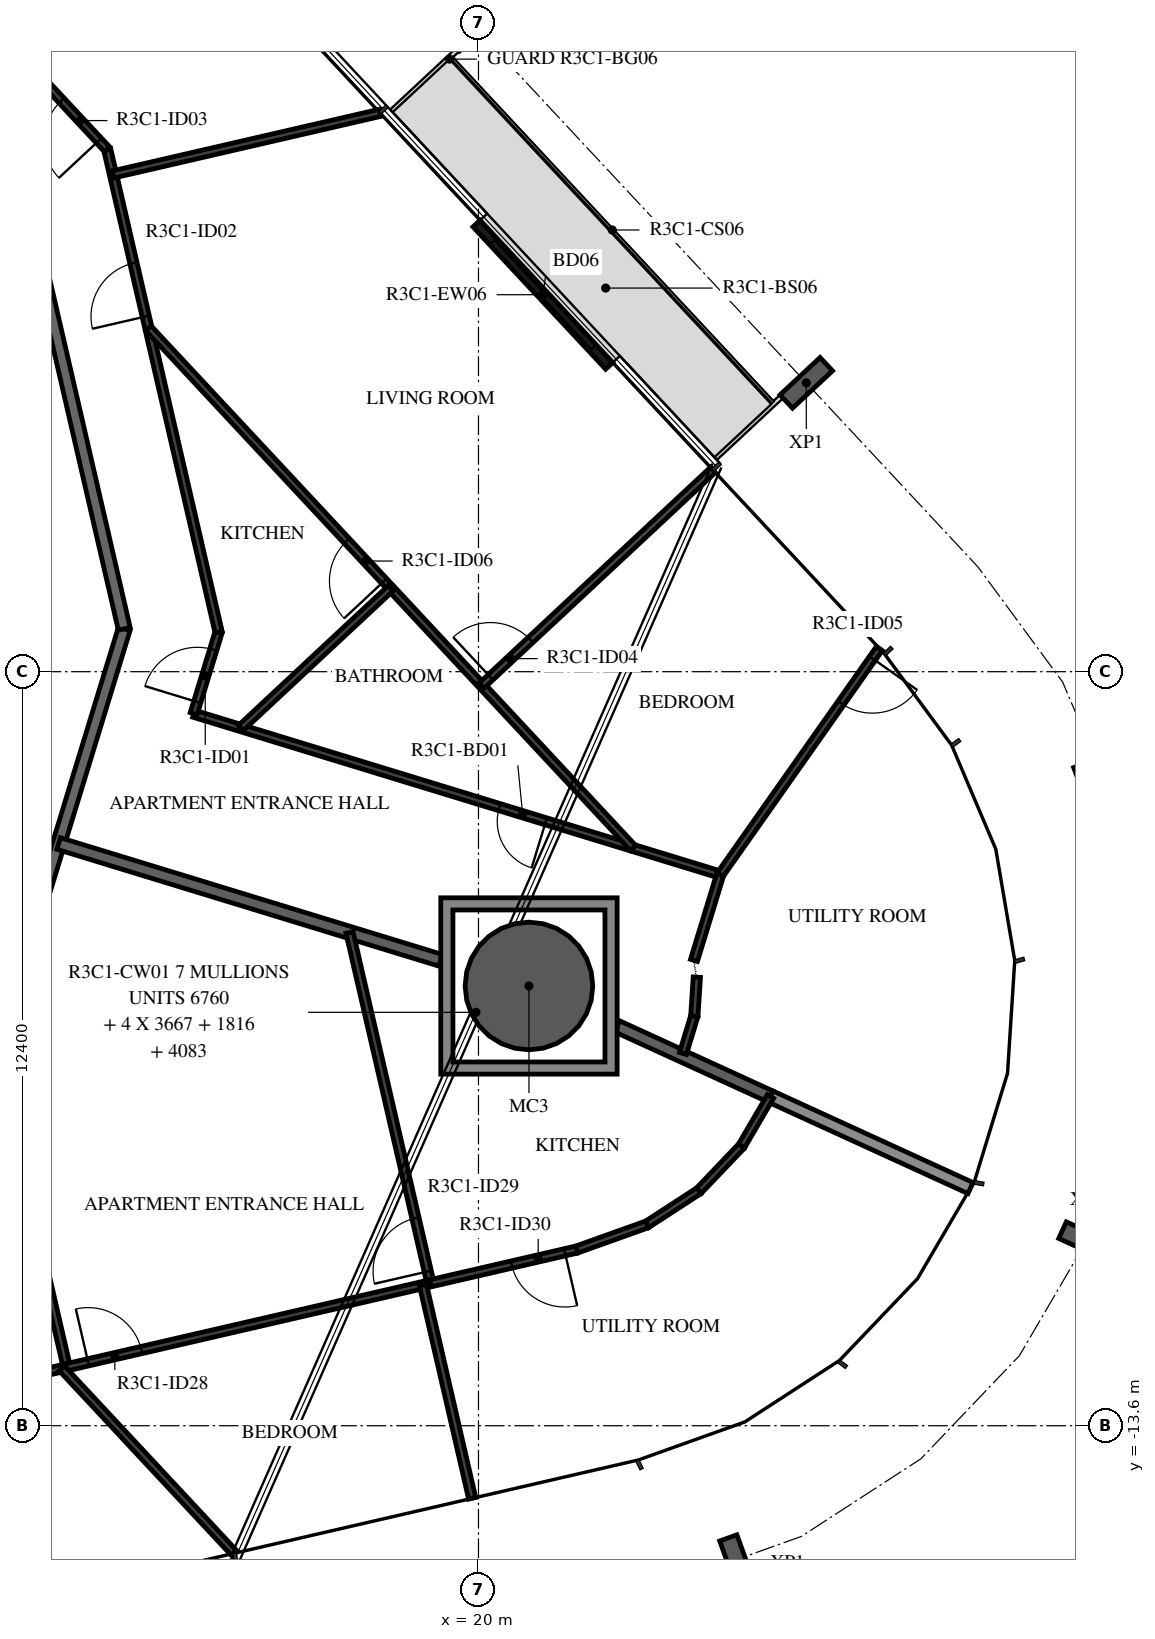
"""IFC4 building model, lengths in metres.
Left out: names, types, materials, properties, quantities, classifications, styles, units other than length and angle.
Written with IfcOpenShell. Run it as: python <this file> out.ifc"""

import sys

from ifc_helpers import new_model, si_unit, direction, frame, frame_2d, origin, origin_2d, place, context, subcontext, project, spatial, polyline, rectangle, hollow_circle, i_section, outline, extrude, element, fill, save


model = new_model("IFC4")
c1 = context("Model", 3, precision=1e-05, world=origin(), true_north=direction((0.0, 1.0)))
c2 = subcontext(c1, "Body", "Model", "MODEL_VIEW")
j1 = project(units=[si_unit("LENGTHUNIT", "METRE"), si_unit("PLANEANGLEUNIT", "RADIAN")], contexts=[c1])
p1 = place(None, origin())
s1 = spatial("IfcSite", under=j1, at=p1, CompositionType="ELEMENT")
p2 = place(p1, origin())
s2 = spatial("IfcBuilding", under=s1, at=p2, CompositionType="ELEMENT")
p3 = place(p2, frame((0.0, 0.0, 137.9)))
s3 = spatial("IfcBuildingStorey", under=s2, at=p3, CompositionType="ELEMENT", Elevation=137.9)
p4 = place(p3, frame((20.83, -6.368, -0.38), z_axis=(0.0, 0.0, 1.0), x_axis=(1.0, 0.0, 0.0)))
e1 = element("IfcColumn", 1, at=p4, inside=s3, PredefinedType="COLUMN", context=c2, shape_type="SweptSolid", body=[
    extrude(hollow_circle(Radius=1.05, WallThickness=0.05, at=origin_2d()), origin(), (0.0, 0.0, 1.0), 3.5),
])
for number, where, z_axis, x_axis in (
    (2, (24.261, -15.868, -0.38), (0.0, 0.0, 1.0), (-0.941, -0.34, 0.0)),
    (3, (30.014, -10.571, -0.38), (0.0, 0.0, 1.0), (-0.416, -0.909, 0.0)),
    (4, (30.262, -2.756, -0.38), (0.0, 0.0, 1.0), (0.358, -0.934, 0.0)),
    (5, (25.391, 3.55, -0.38), (0.0, 0.0, 1.0), (0.682, -0.731, 0.0)),
):
    element("IfcColumn", number, at=place(p3, frame(where, z_axis=z_axis, x_axis=x_axis)), inside=s3, PredefinedType="COLUMN", context=c2, shape_type="SweptSolid", body=[
        extrude(i_section(OverallWidth=0.3, OverallDepth=0.9, WebThickness=0.019, FlangeThickness=0.035, FilletRadius=0.03, at=origin_2d()), origin(), (0.0, 0.0, 1.0), 3.5),
    ])
p5 = place(p3, frame((22.15, 3.829, 0.0), z_axis=(0.0, 0.0, 1.0), x_axis=(-0.682035508355, 0.731319058512, 0.0)))
e6 = element("IfcWall", 6, at=p5, inside=s3, PredefinedType="STANDARD", context=c2, shape_type="SweptSolid", body=[
    extrude(rectangle(XDim=3.2, YDim=0.16, at=frame_2d((1.6, 0.0))), origin(), (0.0, 0.0, 1.0), 3.12),
])
p6 = place(p5, frame((0.4, 0.0, 0.0)))
e7 = element("IfcOpeningElement", 7, at=p6, cuts=e6, PredefinedType="OPENING", context=c2, shape_type="SweptSolid", body=[
    extrude(rectangle(XDim=2.4, YDim=2.4, at=frame_2d((1.2, 1.2))), frame((0.0, 0.09, 0.0), z_axis=(0.0, -1.0, 0.0), x_axis=(1.0, 0.0, 0.0)), (0.0, 0.0, 1.0), 0.18),
])
p7 = place(p3, frame((12.028, -7.516, 0.0), z_axis=(0.0, 0.0, 1.0), x_axis=(0.292365533182, 0.956306642771, 0.0)))
e8 = element("IfcWall", 8, at=p7, inside=s3, PredefinedType="STANDARD", context=c2, shape_type="SweptSolid", body=[
    extrude(rectangle(XDim=7.342, YDim=0.2, at=frame_2d((3.671, 0.0))), origin(), (0.0, 0.0, 1.0), 3.12),
])
p8 = place(p3, frame((14.175, -0.495, 0.0), z_axis=(0.0, 0.0, 1.0), x_axis=(-0.224922649383, 0.974376622151, 0.0)))
e9 = element("IfcWall", 9, at=p8, inside=s3, PredefinedType="STANDARD", context=c2, shape_type="SweptSolid", body=[
    extrude(rectangle(XDim=7.342, YDim=0.2, at=frame_2d((3.671, 0.0))), origin(), (0.0, 0.0, 1.0), 3.12),
])
p9 = place(p3, frame((13.095, -4.026, 0.0), z_axis=(0.0, 0.0, 1.0), x_axis=(0.956303942966, -0.292374363904, 0.0)))
e10 = element("IfcWall", 10, at=p9, inside=s3, PredefinedType="STANDARD", context=c2, shape_type="SweptSolid", body=[
    extrude(rectangle(XDim=6.567, YDim=0.2, at=frame_2d((3.284, 0.0))), origin(), (0.0, 0.0, 1.0), 3.12),
])
p10 = place(p3, frame((22.28, -7.032, 0.0), z_axis=(0.0, 0.0, 1.0), x_axis=(0.909302252994, -0.416136291016, 0.0)))
e11 = element("IfcWall", 11, at=p10, inside=s3, PredefinedType="STANDARD", context=c2, shape_type="SweptSolid", body=[
    extrude(rectangle(XDim=2.773, YDim=0.2, at=frame_2d((1.387, 0.0))), origin(), (0.0, 0.0, 1.0), 3.12),
])
p11 = place(p3, frame((24.802, -8.186, 0.0), z_axis=(0.0, 0.0, 1.0), x_axis=(0.909307466213, -0.416124899387, 0.0)))
e12 = element("IfcWall", 12, at=p11, inside=s3, PredefinedType="STANDARD", context=c2, shape_type="SweptSolid", body=[
    extrude(rectangle(XDim=3.618, YDim=0.2, at=frame_2d((1.809, 0.0))), origin(), (0.0, 0.0, 1.0), 2.73),
])
p12 = place(p3, frame((23.975, -4.537, 0.0), z_axis=(0.0, 0.0, 1.0), x_axis=(-0.956300480156, 0.292385689892, 0.0)))
e13 = element("IfcWall", 13, at=p12, inside=s3, PredefinedType="PARTITIONING", context=c2, shape_type="SweptSolid", body=[
    extrude(rectangle(XDim=9.054, YDim=0.12, at=frame_2d((4.527, 0.0))), origin(), (0.0, 0.0, 1.0), 3.12),
])
p13 = place(p12, frame((2.998, 0.0, 0.0)))
e14 = element("IfcOpeningElement", 14, at=p13, cuts=e13, PredefinedType="OPENING", context=c2, shape_type="SweptSolid", body=[
    extrude(rectangle(XDim=0.8, YDim=2.1, at=frame_2d((0.4, 1.05))), frame((0.0, 0.07, 0.0), z_axis=(0.0, -1.0, 0.0), x_axis=(1.0, 0.0, 0.0)), (0.0, 0.0, 1.0), 0.14),
])
p14 = place(p3, frame((15.317, -1.89, 0.0), z_axis=(0.0, 0.0, 1.0), x_axis=(0.292360095486, 0.956308305186, 0.0)))
e15 = element("IfcWall", 15, at=p14, inside=s3, PredefinedType="PARTITIONING", context=c2, shape_type="SweptSolid", body=[
    extrude(rectangle(XDim=1.402, YDim=0.12, at=frame_2d((0.701, 0.0))), origin(), (0.0, 0.0, 1.0), 3.12),
])
p15 = place(p14, frame((0.2, 0.0, 0.0)))
e16 = element("IfcOpeningElement", 16, at=p15, cuts=e15, PredefinedType="OPENING", context=c2, shape_type="SweptSolid", body=[
    extrude(rectangle(XDim=0.9, YDim=2.1, at=frame_2d((0.45, 1.05))), frame((0.0, 0.07, 0.0), z_axis=(0.0, -1.0, 0.0), x_axis=(1.0, 0.0, 0.0)), (0.0, 0.0, 1.0), 0.14),
])
p16 = place(p3, frame((15.727, -0.549, 0.0), z_axis=(0.0, 0.0, 1.0), x_axis=(-0.22493611855, 0.974373512864, 0.0)))
e17 = element("IfcWall", 17, at=p16, inside=s3, PredefinedType="PARTITIONING", context=c2, shape_type="SweptSolid", body=[
    extrude(rectangle(XDim=8.146, YDim=0.12, at=frame_2d((4.073, 0.0))), origin(), (0.0, 0.0, 1.0), 3.12),
])
p17 = place(p16, frame((5.327, 0.0, 0.0)))
e18 = element("IfcOpeningElement", 18, at=p17, cuts=e17, PredefinedType="OPENING", context=c2, shape_type="SweptSolid", body=[
    extrude(rectangle(XDim=0.9, YDim=2.1, at=frame_2d((0.45, 1.05))), frame((0.0, 0.07, 0.0), z_axis=(0.0, -1.0, 0.0), x_axis=(1.0, 0.0, 0.0)), (0.0, 0.0, 1.0), 0.14),
])
p18 = place(p3, frame((13.894, 7.388, 0.0), z_axis=(0.0, 0.0, 1.0), x_axis=(-0.681994622729, 0.731357186721, 0.0)))
e19 = element("IfcWall", 19, at=p18, inside=s3, PredefinedType="PARTITIONING", context=c2, shape_type="SweptSolid", body=[
    extrude(rectangle(XDim=8.146, YDim=0.12, at=frame_2d((4.073, 0.0))), origin(), (0.0, 0.0, 1.0), 3.12),
])
p19 = place(p18, frame((0.2, 0.0, 0.0)))
e20 = element("IfcOpeningElement", 20, at=p19, cuts=e19, PredefinedType="OPENING", context=c2, shape_type="SweptSolid", body=[
    extrude(rectangle(XDim=0.9, YDim=2.1, at=frame_2d((0.45, 1.05))), frame((0.0, 0.07, 0.0), z_axis=(0.0, -1.0, 0.0), x_axis=(1.0, 0.0, 0.0)), (0.0, 0.0, 1.0), 0.14),
])
for number, where, z_axis, x_axis in (
    (21, (23.362, -7.478, 0.0), (0.0, 0.0, 1.0), (0.293, 0.956, 0.0)),
    (22, (23.55, -6.864, 0.0), (0.0, 0.0, 1.0), (0.064, 0.998, 0.0)),
):
    element("IfcWall", number, at=place(p3, frame(where, z_axis=z_axis, x_axis=x_axis)), inside=s3, PredefinedType="PARTITIONING", context=c2, shape_type="SweptSolid", body=[
        extrude(rectangle(XDim=0.642, YDim=0.12, at=frame_2d((0.321, 0.0))), origin(), (0.0, 0.0, 1.0), 3.12),
    ])
p20 = place(p3, frame((23.544, -5.948, 0.0), z_axis=(0.0, 0.0, 1.0), x_axis=(0.292386782861, 0.956300145983, 0.0)))
e23 = element("IfcWall", 23, at=p20, inside=s3, PredefinedType="PARTITIONING", context=c2, shape_type="SweptSolid", body=[
    extrude(rectangle(XDim=1.475, YDim=0.12, at=frame_2d((0.737, 0.0))), origin(), (0.0, 0.0, 1.0), 3.12),
])
p21 = place(p3, frame((22.543, -4.1, 0.0), z_axis=(0.0, 0.0, 1.0), x_axis=(-0.681980976228, 0.731369911921, 0.0)))
e24 = element("IfcWall", 24, at=p21, inside=s3, PredefinedType="PARTITIONING", context=c2, shape_type="SweptSolid", body=[
    extrude(rectangle(XDim=11.686, YDim=0.12, at=frame_2d((5.843, 0.0))), origin(), (0.0, 0.0, 1.0), 3.12),
])
p22 = place(p21, frame((6.003, 0.0, 0.0)))
e25 = element("IfcOpeningElement", 25, at=p22, cuts=e24, PredefinedType="OPENING", context=c2, shape_type="SweptSolid", body=[
    extrude(rectangle(XDim=0.9, YDim=2.1, at=frame_2d((0.45, 1.05))), frame((0.0, 0.07, 0.0), z_axis=(0.0, -1.0, 0.0), x_axis=(1.0, 0.0, 0.0)), (0.0, 0.0, 1.0), 0.14),
])
p23 = place(p3, frame((16.091, -2.127, 0.0), z_axis=(0.0, 0.0, 1.0), x_axis=(0.731389706697, 0.6819597473, 0.0)))
e26 = element("IfcWall", 26, at=p23, inside=s3, PredefinedType="PARTITIONING", context=c2, shape_type="SweptSolid", body=[
    extrude(rectangle(XDim=3.374, YDim=0.12, at=frame_2d((1.687, 0.0))), origin(), (0.0, 0.0, 1.0), 3.12),
])
p24 = place(p3, frame((18.379, 7.99, 0.0), z_axis=(0.0, 0.0, 1.0), x_axis=(-0.974372926515, -0.224938658471, 0.0)))
e27 = element("IfcWall", 27, at=p24, inside=s3, PredefinedType="PARTITIONING", context=c2, shape_type="SweptSolid", body=[
    extrude(rectangle(XDim=4.505, YDim=0.12, at=frame_2d((2.253, 0.0))), origin(), (0.0, 0.0, 1.0), 3.12),
])
p25 = place(p3, frame((20.052, -1.428, 0.0), z_axis=(0.0, 0.0, 1.0), x_axis=(0.73134872518, 0.682003696601, 0.0)))
e28 = element("IfcWall", 28, at=p25, inside=s3, PredefinedType="PARTITIONING", context=c2, shape_type="SweptSolid", body=[
    extrude(rectangle(XDim=5.2, YDim=0.12, at=frame_2d((2.6, 0.0))), origin(), (0.0, 0.0, 1.0), 2.73),
])
p26 = place(p25, frame((0.2, 0.0, 0.0)))
e29 = element("IfcOpeningElement", 29, at=p26, cuts=e28, PredefinedType="OPENING", context=c2, shape_type="SweptSolid", body=[
    extrude(rectangle(XDim=0.9, YDim=2.1, at=frame_2d((0.45, 1.05))), frame((0.0, 0.07, 0.0), z_axis=(0.0, -1.0, 0.0), x_axis=(1.0, 0.0, 0.0)), (0.0, 0.0, 1.0), 0.14),
])
p27 = place(p3, frame((26.593, -0.818, 0.0), z_axis=(0.0, 0.0, 1.0), x_axis=(-0.575629018128, -0.817710971853, 0.0)))
e30 = element("IfcWall", 30, at=p27, inside=s3, PredefinedType="PARTITIONING", context=c2, shape_type="SweptSolid", body=[
    extrude(rectangle(XDim=4.548, YDim=0.12, at=frame_2d((2.274, 0.0))), origin(), (0.0, 0.0, 1.0), 3.12),
])
p28 = place(p27, frame((0.2, 0.0, 0.0)))
e31 = element("IfcOpeningElement", 31, at=p28, cuts=e30, PredefinedType="OPENING", context=c2, shape_type="SweptSolid", body=[
    extrude(rectangle(XDim=0.9, YDim=2.1, at=frame_2d((0.45, 1.05))), frame((0.0, 0.07, 0.0), z_axis=(0.0, -1.0, 0.0), x_axis=(1.0, 0.0, 0.0)), (0.0, 0.0, 1.0), 0.14),
])
p29 = place(p3, frame((12.434, -9.189, 0.0), z_axis=(0.0, 0.0, 1.0), x_axis=(0.224924972887, -0.974376085796, 0.0)))
e32 = element("IfcWall", 32, at=p29, inside=s3, PredefinedType="PARTITIONING", context=c2, shape_type="SweptSolid", body=[
    extrude(rectangle(XDim=3.541, YDim=0.12, at=frame_2d((1.771, 0.0))), origin(), (0.0, 0.0, 1.0), 3.12),
])
p30 = place(p3, frame((7.249, -14.02, 0.0), z_axis=(0.0, 0.0, 1.0), x_axis=(0.974369514697, 0.224953437023, 0.0)))
e33 = element("IfcWall", 33, at=p30, inside=s3, PredefinedType="PARTITIONING", context=c2, shape_type="SweptSolid", body=[
    extrude(rectangle(XDim=12.149, YDim=0.12, at=frame_2d((6.074, 0.0))), origin(), (0.0, 0.0, 1.0), 3.12),
])
p31 = place(p30, frame((6.498, 0.0, 0.0)))
e34 = element("IfcOpeningElement", 34, at=p31, cuts=e33, PredefinedType="OPENING", context=c2, shape_type="SweptSolid", body=[
    extrude(rectangle(XDim=0.9, YDim=2.1, at=frame_2d((0.45, 1.05))), frame((0.0, 0.07, 0.0), z_axis=(0.0, -1.0, 0.0), x_axis=(1.0, 0.0, 0.0)), (0.0, 0.0, 1.0), 0.14),
])
p32 = place(p3, frame((19.211, -11.258, 0.0), z_axis=(0.0, 0.0, 1.0), x_axis=(-0.22499500936, 0.974359915926, 0.0)))
e35 = element("IfcWall", 35, at=p32, inside=s3, PredefinedType="PARTITIONING", context=c2, shape_type="SweptSolid", body=[
    extrude(rectangle(XDim=5.921, YDim=0.12, at=frame_2d((2.961, 0.0))), origin(), (0.0, 0.0, 1.0), 3.12),
])
p33 = place(p32, frame((0.2, 0.0, 0.0)))
e36 = element("IfcOpeningElement", 36, at=p33, cuts=e35, PredefinedType="OPENING", context=c2, shape_type="SweptSolid", body=[
    extrude(rectangle(XDim=0.9, YDim=2.1, at=frame_2d((0.45, 1.05))), frame((0.0, 0.07, 0.0), z_axis=(0.0, -1.0, 0.0), x_axis=(1.0, 0.0, 0.0)), (0.0, 0.0, 1.0), 0.14),
])
p34 = place(p3, frame((15.985, -15.698, 0.0), z_axis=(0.0, 0.0, 1.0), x_axis=(-0.681979185924, 0.731371581322, 0.0)))
e37 = element("IfcWall", 37, at=p34, inside=s3, PredefinedType="PARTITIONING", context=c2, shape_type="SweptSolid", body=[
    extrude(rectangle(XDim=4.157, YDim=0.12, at=frame_2d((2.079, 0.0))), origin(), (0.0, 0.0, 1.0), 3.12),
])
p35 = place(p3, frame((19.896, -14.794, 0.0), z_axis=(0.0, 0.0, 1.0), x_axis=(-0.224958568294, 0.974368330023, 0.0)))
e38 = element("IfcWall", 38, at=p35, inside=s3, PredefinedType="PARTITIONING", context=c2, shape_type="SweptSolid", body=[
    extrude(rectangle(XDim=3.6, YDim=0.12, at=frame_2d((1.8, 0.0))), origin(), (0.0, 0.0, 1.0), 3.12),
])
p36 = place(p3, frame((24.802, -8.186, 0.0), z_axis=(0.0, 0.0, 1.0), x_axis=(-0.505043103481, -0.863094122113, 0.0)))
e39 = element("IfcWall", 39, at=p36, inside=s3, PredefinedType="PARTITIONING", context=c2, shape_type="SweptSolid", body=[
    extrude(rectangle(XDim=0.945, YDim=0.12, at=frame_2d((0.473, 0.0))), origin(), (0.0, 0.0, 1.0), 3.12),
])
for number, where, z_axis, x_axis in (
    (40, (24.324, -9.002, 0.0), (0.0, 0.0, 1.0), (-0.69, -0.723, 0.0)),
    (41, (23.623, -9.737, 0.0), (0.0, 0.0, 1.0), (-0.839, -0.545, 0.0)),
):
    element("IfcWall", number, at=place(p3, frame(where, z_axis=z_axis, x_axis=x_axis)), inside=s3, PredefinedType="PARTITIONING", context=c2, shape_type="SweptSolid", body=[
        extrude(rectangle(XDim=1.016, YDim=0.12, at=frame_2d((0.508, 0.0))), origin(), (0.0, 0.0, 1.0), 3.12),
    ])
p37 = place(p3, frame((22.771, -10.29, 0.0), z_axis=(0.0, 0.0, 1.0), x_axis=(-0.941701391526, -0.336449831623, 0.0)))
e42 = element("IfcWall", 42, at=p37, inside=s3, PredefinedType="PARTITIONING", context=c2, shape_type="SweptSolid", body=[
    extrude(rectangle(XDim=1.227, YDim=0.12, at=frame_2d((0.614, 0.0))), origin(), (0.0, 0.0, 1.0), 3.12),
])
p38 = place(p3, frame((21.615, -10.703, 0.0), z_axis=(0.0, 0.0, 1.0), x_axis=(-0.974361171506, -0.224989571893, 0.0)))
e43 = element("IfcWall", 43, at=p38, inside=s3, PredefinedType="PARTITIONING", context=c2, shape_type="SweptSolid", body=[
    extrude(rectangle(XDim=2.468, YDim=0.12, at=frame_2d((1.234, 0.0))), origin(), (0.0, 0.0, 1.0), 3.12),
])
p39 = place(p38, frame((0.2, 0.0, 0.0)))
e44 = element("IfcOpeningElement", 44, at=p39, cuts=e43, PredefinedType="OPENING", context=c2, shape_type="SweptSolid", body=[
    extrude(rectangle(XDim=0.9, YDim=2.1, at=frame_2d((0.45, 1.05))), frame((0.0, 0.07, 0.0), z_axis=(0.0, -1.0, 0.0), x_axis=(1.0, 0.0, 0.0)), (0.0, 0.0, 1.0), 0.14),
])
p40 = place(p3, origin())
e45 = element("IfcWall", 45, at=p40, inside=s3, PredefinedType="STANDARD", context=c2, shape_type="SweptSolid", body=[
    extrude(outline(polyline([(22.28, -4.918), (22.28, -7.818), (19.38, -7.818), (19.38, -4.918), (22.28, -4.918)]), holes=[polyline([(19.58, -7.618), (22.08, -7.618), (22.08, -5.118), (19.58, -5.118), (19.58, -7.618)])]), origin(), (0.0, 0.0, 1.0), 3.12),
])
p41 = place(p6, origin())
e46 = element("IfcDoor", 46, at=p41, inside=s3, OperationType="DOUBLE_DOOR_SLIDING", PredefinedType="DOOR", context=c2, shape_type="SweptSolid", body=[
    extrude(rectangle(XDim=2.4, YDim=2.4, at=frame_2d((1.2, 1.2))), frame((0.0, 0.025, 0.0), z_axis=(0.0, -1.0, 0.0), x_axis=(1.0, 0.0, 0.0)), (0.0, 0.0, 1.0), 0.05),
])
fill(e7, e46)
p42 = place(p15, origin())
e47 = element("IfcDoor", 47, at=p42, inside=s3, OperationType="SINGLE_SWING_LEFT", PredefinedType="DOOR", context=c2, shape_type="SweptSolid", body=[
    extrude(rectangle(XDim=0.9, YDim=2.1, at=frame_2d((0.45, 1.05))), frame((0.0, 0.025, 0.0), z_axis=(0.0, -1.0, 0.0), x_axis=(1.0, 0.0, 0.0)), (0.0, 0.0, 1.0), 0.05),
])
fill(e16, e47)
p43 = place(p17, origin())
e48 = element("IfcDoor", 48, at=p43, inside=s3, OperationType="SINGLE_SWING_LEFT", PredefinedType="DOOR", context=c2, shape_type="SweptSolid", body=[
    extrude(rectangle(XDim=0.9, YDim=2.1, at=frame_2d((0.45, 1.05))), frame((0.0, 0.025, 0.0), z_axis=(0.0, -1.0, 0.0), x_axis=(1.0, 0.0, 0.0)), (0.0, 0.0, 1.0), 0.05),
])
fill(e18, e48)
p44 = place(p19, origin())
e49 = element("IfcDoor", 49, at=p44, inside=s3, OperationType="SINGLE_SWING_LEFT", PredefinedType="DOOR", context=c2, shape_type="SweptSolid", body=[
    extrude(rectangle(XDim=0.9, YDim=2.1, at=frame_2d((0.45, 1.05))), frame((0.0, 0.025, 0.0), z_axis=(0.0, -1.0, 0.0), x_axis=(1.0, 0.0, 0.0)), (0.0, 0.0, 1.0), 0.05),
])
fill(e20, e49)
p45 = place(p13, origin())
e50 = element("IfcDoor", 50, at=p45, inside=s3, OperationType="SINGLE_SWING_LEFT", PredefinedType="DOOR", context=c2, shape_type="SweptSolid", body=[
    extrude(rectangle(XDim=0.8, YDim=2.1, at=frame_2d((0.4, 1.05))), frame((0.0, 0.025, 0.0), z_axis=(0.0, -1.0, 0.0), x_axis=(1.0, 0.0, 0.0)), (0.0, 0.0, 1.0), 0.05),
])
fill(e14, e50)
p46 = place(p26, origin())
e51 = element("IfcDoor", 51, at=p46, inside=s3, OperationType="SINGLE_SWING_LEFT", PredefinedType="DOOR", context=c2, shape_type="SweptSolid", body=[
    extrude(rectangle(XDim=0.9, YDim=2.1, at=frame_2d((0.45, 1.05))), frame((0.0, 0.025, 0.0), z_axis=(0.0, -1.0, 0.0), x_axis=(1.0, 0.0, 0.0)), (0.0, 0.0, 1.0), 0.05),
])
fill(e29, e51)
p47 = place(p28, origin())
e52 = element("IfcDoor", 52, at=p47, inside=s3, OperationType="SINGLE_SWING_LEFT", PredefinedType="DOOR", context=c2, shape_type="SweptSolid", body=[
    extrude(rectangle(XDim=0.9, YDim=2.1, at=frame_2d((0.45, 1.05))), frame((0.0, 0.025, 0.0), z_axis=(0.0, -1.0, 0.0), x_axis=(1.0, 0.0, 0.0)), (0.0, 0.0, 1.0), 0.05),
])
fill(e31, e52)
p48 = place(p22, origin())
e53 = element("IfcDoor", 53, at=p48, inside=s3, OperationType="SINGLE_SWING_RIGHT", PredefinedType="DOOR", context=c2, shape_type="SweptSolid", body=[
    extrude(rectangle(XDim=0.9, YDim=2.1, at=frame_2d((0.45, 1.05))), frame((0.0, 0.025, 0.0), z_axis=(0.0, -1.0, 0.0), x_axis=(1.0, 0.0, 0.0)), (0.0, 0.0, 1.0), 0.05),
])
fill(e25, e53)
p49 = place(p31, origin())
e54 = element("IfcDoor", 54, at=p49, inside=s3, OperationType="SINGLE_SWING_RIGHT", PredefinedType="DOOR", context=c2, shape_type="SweptSolid", body=[
    extrude(rectangle(XDim=0.9, YDim=2.1, at=frame_2d((0.45, 1.05))), frame((0.0, 0.025, 0.0), z_axis=(0.0, -1.0, 0.0), x_axis=(1.0, 0.0, 0.0)), (0.0, 0.0, 1.0), 0.05),
])
fill(e34, e54)
p50 = place(p33, origin())
e55 = element("IfcDoor", 55, at=p50, inside=s3, OperationType="SINGLE_SWING_RIGHT", PredefinedType="DOOR", context=c2, shape_type="SweptSolid", body=[
    extrude(rectangle(XDim=0.9, YDim=2.1, at=frame_2d((0.45, 1.05))), frame((0.0, 0.025, 0.0), z_axis=(0.0, -1.0, 0.0), x_axis=(1.0, 0.0, 0.0)), (0.0, 0.0, 1.0), 0.05),
])
fill(e36, e55)
p51 = place(p39, origin())
e56 = element("IfcDoor", 56, at=p51, inside=s3, OperationType="SINGLE_SWING_RIGHT", PredefinedType="DOOR", context=c2, shape_type="SweptSolid", body=[
    extrude(rectangle(XDim=0.9, YDim=2.1, at=frame_2d((0.45, 1.05))), frame((0.0, 0.025, 0.0), z_axis=(0.0, -1.0, 0.0), x_axis=(1.0, 0.0, 0.0)), (0.0, 0.0, 1.0), 0.05),
])
fill(e44, e56)
save(model, sys.argv[1])
